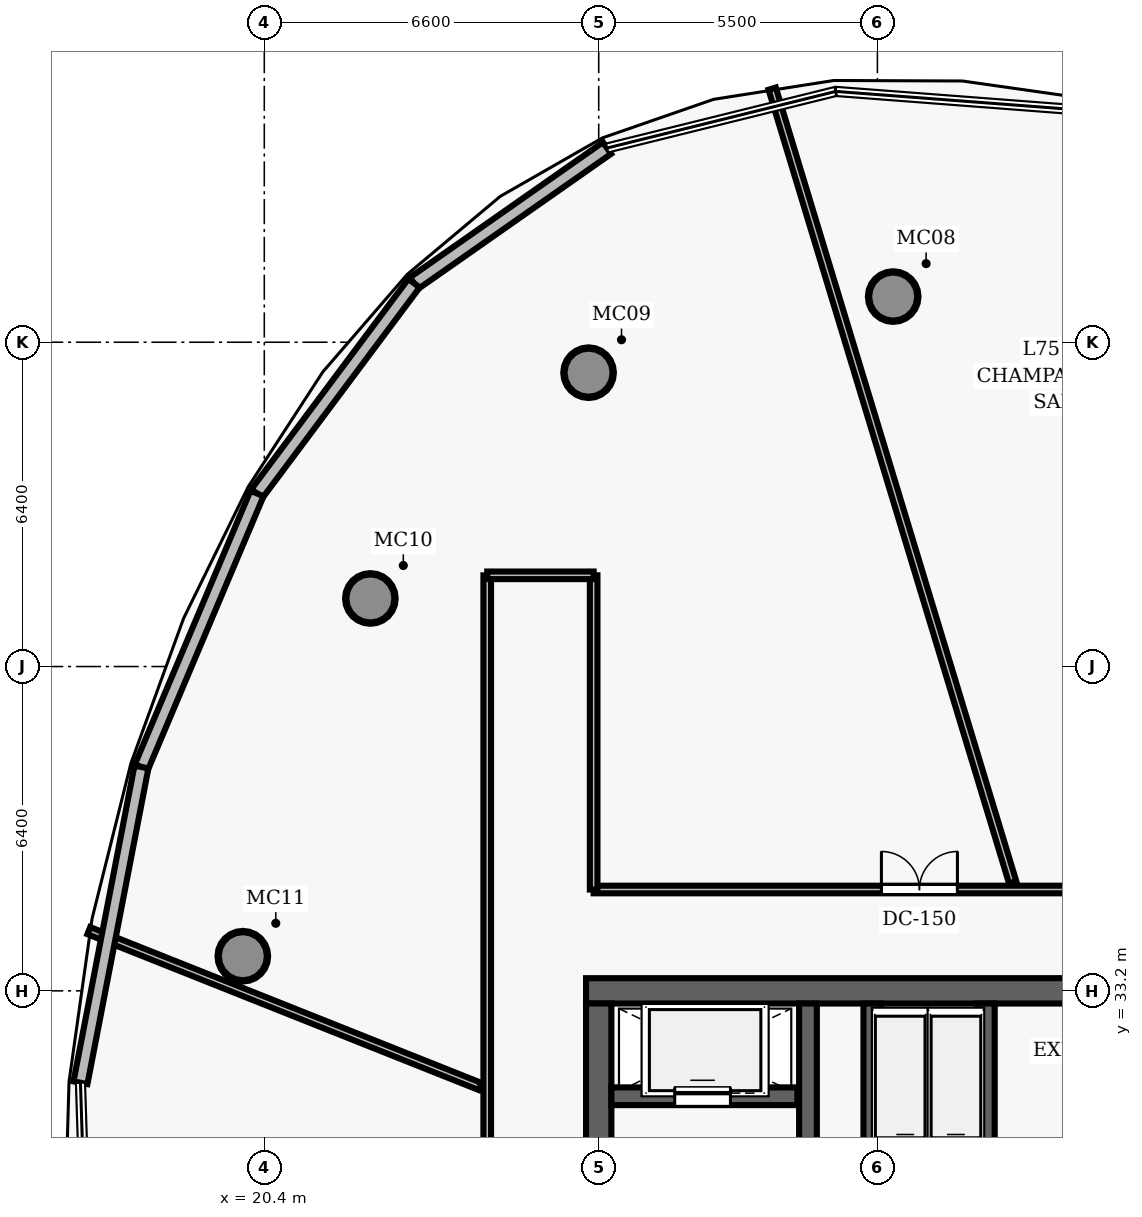
"""IFC4 building model, lengths in metres.
Left out: names, types, materials, properties, quantities, classifications, styles, units other than length and angle.
Written with IfcOpenShell. Run it as: python <this file> out.ifc"""

import sys

from ifc_helpers import new_model, si_unit, direction, frame, frame_2d, origin, origin_2d, place, context, subcontext, project, spatial, rectangle, hollow_circle, extrude, element, fill, save


model = new_model("IFC4")
c1 = context("Model", 3, precision=1e-05, world=origin(), true_north=direction((0.0, 1.0)))
c2 = subcontext(c1, "Body", "Model", "MODEL_VIEW")
j1 = project(units=[si_unit("LENGTHUNIT", "METRE"), si_unit("PLANEANGLEUNIT", "RADIAN")], contexts=[c1])
p1 = place(None, origin())
s1 = spatial("IfcSite", under=j1, at=p1, CompositionType="ELEMENT")
p2 = place(p1, origin())
s2 = spatial("IfcBuilding", under=s1, at=p2, CompositionType="ELEMENT")
p3 = place(p2, frame((0.0, 0.0, 295.95)))
s3 = spatial("IfcBuildingStorey", under=s2, at=p3, CompositionType="ELEMENT", Elevation=295.95)
p4 = place(p3, frame((26.75, 33.2, 0.0), z_axis=(0.0, 0.0, 1.0), x_axis=(1.0, 0.0, 0.0)))
e1 = element("IfcWall", 1, at=p4, inside=s3, PredefinedType="SHEAR", context=c2, shape_type="SweptSolid", body=[
    extrude(rectangle(XDim=22.5, YDim=0.5, at=frame_2d((11.25, 0.0))), origin(), (0.0, 0.0, 1.0), 3.85),
])
p5 = place(p3, frame((27.0, 19.05, 0.0), z_axis=(0.0, 0.0, 1.0), x_axis=(0.0, 1.0, 0.0)))
e2 = element("IfcWall", 2, at=p5, inside=s3, PredefinedType="SHEAR", context=c2, shape_type="SweptSolid", body=[
    extrude(rectangle(XDim=13.9, YDim=0.5, at=frame_2d((6.95, 0.0))), origin(), (0.0, 0.0, 1.0), 3.85),
])
p6 = place(p5, frame((8.2, 0.0, 0.0)))
e3 = element("IfcOpeningElement", 3, at=p6, cuts=e2, PredefinedType="OPENING", context=c2, shape_type="SweptSolid", body=[
    extrude(rectangle(XDim=1.05, YDim=2.15, at=frame_2d((0.525, 1.075))), frame((0.0, 0.26, 0.0), z_axis=(0.0, -1.0, 0.0), x_axis=(1.0, 0.0, 0.0)), (0.0, 0.0, 1.0), 0.52),
])
p7 = place(p3, frame((31.13, 19.05, 0.0), z_axis=(0.0, 0.0, 1.0), x_axis=(0.0, 1.0, 0.0)))
e4 = element("IfcWall", 4, at=p7, inside=s3, PredefinedType="SHEAR", context=c2, shape_type="SweptSolid", body=[
    extrude(rectangle(XDim=13.9, YDim=0.35, at=frame_2d((6.95, 0.0))), origin(), (0.0, 0.0, 1.0), 3.85),
])
for number, where, z_axis, x_axis in (
    (5, (32.812, 46.901, 0.0), (0.0, 0.0, 1.0), (1.0, 0.0, 0.0)),
    (6, (26.8, 45.399, 0.0), (0.0, 0.0, 1.0), (1.0, 0.0, 0.0)),
    (7, (22.494, 40.944, 0.0), (0.0, 0.0, 1.0), (1.0, 0.0, 0.0)),
    (8, (19.976, 33.884, 0.0), (0.0, 0.0, 1.0), (1.0, 0.0, 0.0)),
):
    element("IfcColumn", number, at=place(p3, frame(where, z_axis=z_axis, x_axis=x_axis)), inside=s3, PredefinedType="COLUMN", context=c2, shape_type="SweptSolid", body=[
        extrude(hollow_circle(Radius=0.5, WallThickness=0.045, at=origin_2d()), origin(), (0.0, 0.0, 1.0), 3.85),
    ])
p8 = place(p3, frame((27.25, 31.12, 0.0), z_axis=(0.0, 0.0, 1.0), x_axis=(1.0, 0.0, 0.0)))
e9 = element("IfcWall", 9, at=p8, inside=s3, PredefinedType="SHEAR", context=c2, shape_type="SweptSolid", body=[
    extrude(rectangle(XDim=3.67, YDim=0.35, at=frame_2d((1.835, 0.0))), origin(), (0.0, 0.0, 1.0), 3.04),
])
p9 = place(p8, frame((1.25, 0.0, 0.0)))
e10 = element("IfcOpeningElement", 10, at=p9, cuts=e9, PredefinedType="OPENING", context=c2, shape_type="SweptSolid", body=[
    extrude(rectangle(XDim=1.1, YDim=2.15, at=frame_2d((0.55, 1.075))), frame((0.0, 0.185, 0.0), z_axis=(0.0, -1.0, 0.0), x_axis=(1.0, 0.0, 0.0)), (0.0, 0.0, 1.0), 0.37),
])
p10 = place(p3, frame((34.64, 26.69, 0.0), z_axis=(0.0, 0.0, 1.0), x_axis=(0.0, 1.0, 0.0)))
e11 = element("IfcWall", 11, at=p10, inside=s3, PredefinedType="SHEAR", context=c2, shape_type="SweptSolid", body=[
    extrude(rectangle(XDim=6.26, YDim=0.35, at=frame_2d((3.13, 0.0))), origin(), (0.0, 0.0, 1.0), 3.85),
])
p11 = place(p10, frame((0.85, 0.0, 0.0)))
e12 = element("IfcOpeningElement", 12, at=p11, cuts=e11, PredefinedType="OPENING", context=c2, shape_type="SweptSolid", body=[
    extrude(rectangle(XDim=1.05, YDim=2.15, at=frame_2d((0.525, 1.075))), frame((0.0, 0.185, 0.0), z_axis=(0.0, -1.0, 0.0), x_axis=(1.0, 0.0, 0.0)), (0.0, 0.0, 1.0), 0.37),
])
p12 = place(p3, frame((32.4, 30.22, 0.0), z_axis=(0.0, 0.0, 1.0), x_axis=(0.0, 1.0, 0.0)))
e13 = element("IfcWall", 13, at=p12, inside=s3, PredefinedType="SHEAR", context=c2, shape_type="SweptSolid", body=[
    extrude(rectangle(XDim=2.73, YDim=0.35, at=frame_2d((1.365, 0.0))), origin(), (0.0, 0.0, 1.0), 3.04),
])
p13 = place(p3, frame((26.9, 35.2, 0.0), z_axis=(0.0, 0.0, 1.0), x_axis=(1.0, 0.0, 0.0)))
e14 = element("IfcWall", 14, at=p13, inside=s3, PredefinedType="PARTITIONING", context=c2, shape_type="SweptSolid", body=[
    extrude(rectangle(XDim=10.05, YDim=0.15, at=frame_2d((5.025, 0.0))), origin(), (0.0, 0.0, 1.0), 3.04),
])
p14 = place(p13, frame((5.679, 0.0, 0.0)))
e15 = element("IfcOpeningElement", 15, at=p14, cuts=e14, PredefinedType="OPENING", context=c2, shape_type="SweptSolid", body=[
    extrude(rectangle(XDim=1.5, YDim=2.2, at=frame_2d((0.75, 1.1))), frame((0.0, 0.085, 0.0), z_axis=(0.0, -1.0, 0.0), x_axis=(1.0, 0.0, 0.0)), (0.0, 0.0, 1.0), 0.17),
])
p15 = place(p3, frame((24.8, 11.208, 0.0), z_axis=(0.0, 0.0, 1.0), x_axis=(0.0, 1.0, 0.0)))
e16 = element("IfcWall", 16, at=p15, inside=s3, PredefinedType="PARTITIONING", context=c2, shape_type="SweptSolid", body=[
    extrude(rectangle(XDim=30.192, YDim=0.15, at=frame_2d((15.096, 0.0))), origin(), (0.0, 0.0, 1.0), 3.04),
])
p16 = place(p15, frame((16.542, 0.0, 0.0)))
e17 = element("IfcOpeningElement", 17, at=p16, cuts=e16, PredefinedType="OPENING", context=c2, shape_type="SweptSolid", body=[
    extrude(rectangle(XDim=0.95, YDim=2.15, at=frame_2d((0.475, 1.075))), frame((0.0, 0.085, 0.0), z_axis=(0.0, -1.0, 0.0), x_axis=(1.0, 0.0, 0.0)), (0.0, 0.0, 1.0), 0.17),
])
p17 = place(p3, frame((26.9, 35.2, 0.0), z_axis=(0.0, 0.0, 1.0), x_axis=(0.0, 1.0, 0.0)))
e18 = element("IfcWall", 18, at=p17, inside=s3, PredefinedType="PARTITIONING", context=c2, shape_type="SweptSolid", body=[
    extrude(rectangle(XDim=6.2, YDim=0.15, at=frame_2d((3.1, 0.0))), origin(), (0.0, 0.0, 1.0), 3.04),
])
p18 = place(p3, frame((24.8, 41.4, 0.0), z_axis=(0.0, 0.0, 1.0), x_axis=(1.0, 0.0, 0.0)))
e19 = element("IfcWall", 19, at=p18, inside=s3, PredefinedType="PARTITIONING", context=c2, shape_type="SweptSolid", body=[
    extrude(rectangle(XDim=2.1, YDim=0.15, at=frame_2d((1.05, 0.0))), origin(), (0.0, 0.0, 1.0), 3.04),
])
p19 = place(p3, frame((35.17, 35.34, 0.0), z_axis=(0.0, 0.0, 1.0), x_axis=(-0.289993319939, 0.957028669576, 0.0)))
e20 = element("IfcWall", 20, at=p19, inside=s3, PredefinedType="PARTITIONING", context=c2, shape_type="SweptSolid", body=[
    extrude(rectangle(XDim=16.368, YDim=0.15, at=frame_2d((8.184, 0.0))), origin(), (0.0, 0.0, 1.0), 3.04),
])
p20 = place(p3, frame((24.66, 31.312, 0.0), z_axis=(0.0, 0.0, 1.0), x_axis=(-0.929042706144, 0.369972499194, 0.0)))
e21 = element("IfcWall", 21, at=p20, inside=s3, PredefinedType="PARTITIONING", context=c2, shape_type="SweptSolid", body=[
    extrude(rectangle(XDim=8.313, YDim=0.15, at=frame_2d((4.157, 0.0))), origin(), (0.0, 0.0, 1.0), 3.04),
])
p21 = place(p3, frame((23.354, 47.165, 0.0), z_axis=(0.0, 0.0, 1.0), x_axis=(0.819177657249, 0.573539855515, 0.0)))
e22 = element("IfcWall", 22, at=p21, inside=s3, PredefinedType="SOLIDWALL", context=c2, shape_type="SweptSolid", body=[
    extrude(rectangle(XDim=4.65, YDim=0.28, at=frame_2d((2.325, 0.0))), origin(), (0.0, 0.0, 1.0), 3.625),
])
p22 = place(p3, frame((20.256, 43.015, 0.0), z_axis=(0.0, 0.0, 1.0), x_axis=(0.598271477018, 0.801293479186, 0.0)))
e23 = element("IfcWall", 23, at=p22, inside=s3, PredefinedType="SOLIDWALL", context=c2, shape_type="SweptSolid", body=[
    extrude(rectangle(XDim=5.179, YDim=0.28, at=frame_2d((2.59, 0.0))), origin(), (0.0, 0.0, 1.0), 3.625),
])
p23 = place(p3, frame((17.975, 37.617, 0.0), z_axis=(0.0, 0.0, 1.0), x_axis=(0.389207748927, 0.92115000308, 0.0)))
e24 = element("IfcWall", 24, at=p23, inside=s3, PredefinedType="SOLIDWALL", context=c2, shape_type="SweptSolid", body=[
    extrude(rectangle(XDim=5.86, YDim=0.28, at=frame_2d((2.93, 0.0))), origin(), (0.0, 0.0, 1.0), 3.625),
])
p24 = place(p3, frame((16.772, 31.387, 0.0), z_axis=(0.0, 0.0, 1.0), x_axis=(0.189578027275, 0.981865658619, 0.0)))
e25 = element("IfcWall", 25, at=p24, inside=s3, PredefinedType="SOLIDWALL", context=c2, shape_type="SweptSolid", body=[
    extrude(rectangle(XDim=6.345, YDim=0.28, at=frame_2d((3.172, 0.0))), origin(), (0.0, 0.0, 1.0), 3.625),
])
p25 = place(p14, origin())
e26 = element("IfcDoor", 26, at=p25, inside=s3, OperationType="DOUBLE_DOOR_SINGLE_SWING", PredefinedType="DOOR", context=c2, shape_type="SweptSolid", body=[
    extrude(rectangle(XDim=1.5, YDim=2.2, at=frame_2d((0.75, 1.1))), frame((0.0, 0.025, 0.0), z_axis=(0.0, -1.0, 0.0), x_axis=(1.0, 0.0, 0.0)), (0.0, 0.0, 1.0), 0.05),
])
fill(e15, e26)
p26 = place(p9, origin())
e27 = element("IfcDoor", 27, at=p26, inside=s3, OperationType="SLIDING_TO_LEFT", PredefinedType="DOOR", context=c2, shape_type="SweptSolid", body=[
    extrude(rectangle(XDim=1.1, YDim=2.15, at=frame_2d((0.55, 1.075))), frame((0.0, 0.025, 0.0), z_axis=(0.0, -1.0, 0.0), x_axis=(1.0, 0.0, 0.0)), (0.0, 0.0, 1.0), 0.05),
])
fill(e10, e27)
save(model, sys.argv[1])
